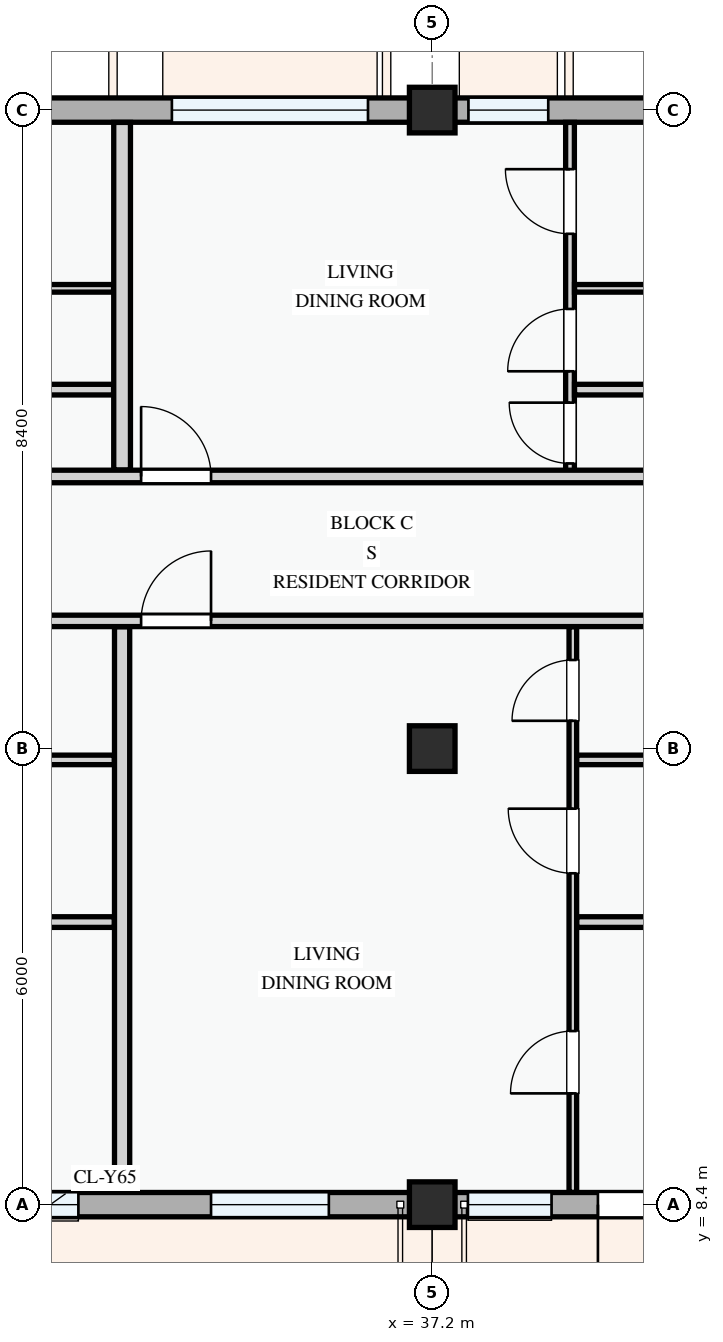
"""IFC4 building model, lengths in metres.
Left out: names, types, materials, properties, quantities, classifications, styles, units other than length and angle.
Written with IfcOpenShell. Run it as: python <this file> out.ifc"""

import sys

from ifc_helpers import new_model, si_unit, direction, frame, frame_2d, origin, origin_2d, place, context, subcontext, project, spatial, rectangle, extrude, element, fill, save


model = new_model("IFC4")
c1 = context("Model", 3, precision=1e-05, world=origin(), true_north=direction((0.0, 1.0)))
c2 = subcontext(c1, "Body", "Model", "MODEL_VIEW")
j1 = project(units=[si_unit("LENGTHUNIT", "METRE"), si_unit("PLANEANGLEUNIT", "RADIAN")], contexts=[c1])
p1 = place(None, origin())
s1 = spatial("IfcSite", under=j1, at=p1, CompositionType="ELEMENT")
p2 = place(p1, origin())
s2 = spatial("IfcBuilding", under=s1, at=p2, CompositionType="ELEMENT")
p3 = place(p2, frame((0.0, 0.0, 14.7)))
s3 = spatial("IfcBuildingStorey", under=s2, at=p3, CompositionType="ELEMENT", Elevation=14.7)
for number, where, z_axis, x_axis in (
    (1, (37.2, 8.4, 0.0), (0.0, 0.0, 1.0), (1.0, 0.0, 0.0)),
    (2, (37.2, 14.4, 0.0), (0.0, 0.0, 1.0), (1.0, 0.0, 0.0)),
    (3, (37.2, 22.8, 0.0), (0.0, 0.0, 1.0), (1.0, 0.0, 0.0)),
):
    element("IfcColumn", number, at=place(p3, frame(where, z_axis=z_axis, x_axis=x_axis)), inside=s3, PredefinedType="COLUMN", context=c2, shape_type="SweptSolid", body=[
        extrude(rectangle(XDim=0.6, YDim=0.6, at=origin_2d()), origin(), (0.0, 0.0, 1.0), 3.3),
    ])
p4 = place(p3, frame((28.8, 8.4, 0.0), z_axis=(0.0, 0.0, 1.0), x_axis=(1.0, 0.0, 0.0)))
e4 = element("IfcWall", 4, at=p4, inside=s3, PredefinedType="STANDARD", context=c2, shape_type="SweptSolid", body=[
    extrude(rectangle(XDim=8.4, YDim=0.32, at=frame_2d((4.2, 0.0))), origin(), (0.0, 0.0, 1.0), 2.375),
])
p5 = place(p4, frame((0.62, 0.0, 0.0)))
e5 = element("IfcOpeningElement", 5, at=p5, cuts=e4, PredefinedType="OPENING", context=c2, shape_type="SweptSolid", body=[
    extrude(rectangle(XDim=1.25, YDim=2.2, at=frame_2d((0.625, 1.1))), frame((0.0, 0.17, 0.0), z_axis=(0.0, -1.0, 0.0), x_axis=(1.0, 0.0, 0.0)), (0.0, 0.0, 1.0), 0.34),
])
p6 = place(p4, frame((2.495, 0.0, 0.78)))
e6 = element("IfcOpeningElement", 6, at=p6, cuts=e4, PredefinedType="OPENING", context=c2, shape_type="SweptSolid", body=[
    extrude(rectangle(XDim=1.25, YDim=1.3, at=frame_2d((0.625, 0.65))), frame((0.0, 0.17, 0.0), z_axis=(0.0, -1.0, 0.0), x_axis=(1.0, 0.0, 0.0)), (0.0, 0.0, 1.0), 0.34),
])
p7 = place(p4, frame((5.49, 0.0, 0.78)))
e7 = element("IfcOpeningElement", 7, at=p7, cuts=e4, PredefinedType="OPENING", context=c2, shape_type="SweptSolid", body=[
    extrude(rectangle(XDim=1.55, YDim=1.4, at=frame_2d((0.775, 0.7))), frame((0.0, 0.17, 0.0), z_axis=(0.0, -1.0, 0.0), x_axis=(1.0, 0.0, 0.0)), (0.0, 0.0, 1.0), 0.34),
])
p8 = place(p3, frame((37.2, 8.4, 0.0), z_axis=(0.0, 0.0, 1.0), x_axis=(1.0, 0.0, 0.0)))
e8 = element("IfcWall", 8, at=p8, inside=s3, PredefinedType="STANDARD", context=c2, shape_type="SweptSolid", body=[
    extrude(rectangle(XDim=6.0, YDim=0.32, at=frame_2d((3.0, 0.0))), origin(), (0.0, 0.0, 1.0), 2.475),
])
p9 = place(p8, frame((2.18, 0.0, 0.0)))
e9 = element("IfcOpeningElement", 9, at=p9, cuts=e8, PredefinedType="OPENING", context=c2, shape_type="SweptSolid", body=[
    extrude(rectangle(XDim=1.3, YDim=2.15, at=frame_2d((0.65, 1.075))), frame((0.0, 0.17, 0.0), z_axis=(0.0, -1.0, 0.0), x_axis=(1.0, 0.0, 0.0)), (0.0, 0.0, 1.0), 0.34),
])
p10 = place(p8, frame((0.47, 0.0, 0.78)))
e10 = element("IfcOpeningElement", 10, at=p10, cuts=e8, PredefinedType="OPENING", context=c2, shape_type="SweptSolid", body=[
    extrude(rectangle(XDim=1.1, YDim=1.3, at=frame_2d((0.55, 0.65))), frame((0.0, 0.17, 0.0), z_axis=(0.0, -1.0, 0.0), x_axis=(1.0, 0.0, 0.0)), (0.0, 0.0, 1.0), 0.34),
])
p11 = place(p8, frame((3.88, 0.0, 0.78)))
e11 = element("IfcOpeningElement", 11, at=p11, cuts=e8, PredefinedType="OPENING", context=c2, shape_type="SweptSolid", body=[
    extrude(rectangle(XDim=1.58, YDim=1.48, at=frame_2d((0.79, 0.74))), frame((0.0, 0.17, 0.0), z_axis=(0.0, -1.0, 0.0), x_axis=(1.0, 0.0, 0.0)), (0.0, 0.0, 1.0), 0.34),
])
p12 = place(p3, frame((43.2, 22.8, 0.0), z_axis=(0.0, 0.0, 1.0), x_axis=(-1.0, 0.0, 0.0)))
e12 = element("IfcWall", 12, at=p12, inside=s3, PredefinedType="STANDARD", context=c2, shape_type="SweptSolid", body=[
    extrude(rectangle(XDim=6.0, YDim=0.32, at=frame_2d((3.0, 0.0))), origin(), (0.0, 0.0, 1.0), 2.475),
])
p13 = place(p12, frame((1.439, 0.0, 0.78)))
e13 = element("IfcOpeningElement", 13, at=p13, cuts=e12, PredefinedType="OPENING", context=c2, shape_type="SweptSolid", body=[
    extrude(rectangle(XDim=1.5, YDim=1.5, at=frame_2d((0.75, 0.75))), frame((0.0, 0.17, 0.0), z_axis=(0.0, -1.0, 0.0), x_axis=(1.0, 0.0, 0.0)), (0.0, 0.0, 1.0), 0.34),
])
p14 = place(p12, frame((4.474, 0.0, 0.78)))
e14 = element("IfcOpeningElement", 14, at=p14, cuts=e12, PredefinedType="OPENING", context=c2, shape_type="SweptSolid", body=[
    extrude(rectangle(XDim=1.05, YDim=1.2, at=frame_2d((0.525, 0.6))), frame((0.0, 0.17, 0.0), z_axis=(0.0, -1.0, 0.0), x_axis=(1.0, 0.0, 0.0)), (0.0, 0.0, 1.0), 0.34),
])
p15 = place(p3, frame((37.2, 22.8, 0.0), z_axis=(0.0, 0.0, 1.0), x_axis=(-1.0, 0.0, 0.0)))
e15 = element("IfcWall", 15, at=p15, inside=s3, PredefinedType="STANDARD", context=c2, shape_type="SweptSolid", body=[
    extrude(rectangle(XDim=8.4, YDim=0.32, at=frame_2d((4.2, 0.0))), origin(), (0.0, 0.0, 1.0), 2.375),
])
p16 = place(p15, frame((0.845, 0.0, 0.78)))
e16 = element("IfcOpeningElement", 16, at=p16, cuts=e15, PredefinedType="OPENING", context=c2, shape_type="SweptSolid", body=[
    extrude(rectangle(XDim=2.58, YDim=1.48, at=frame_2d((1.29, 0.74))), frame((0.0, 0.17, 0.0), z_axis=(0.0, -1.0, 0.0), x_axis=(1.0, 0.0, 0.0)), (0.0, 0.0, 1.0), 0.34),
])
p17 = place(p15, frame((5.495, 0.0, 0.78)))
e17 = element("IfcOpeningElement", 17, at=p17, cuts=e15, PredefinedType="OPENING", context=c2, shape_type="SweptSolid", body=[
    extrude(rectangle(XDim=1.3, YDim=1.4, at=frame_2d((0.65, 0.7))), frame((0.0, 0.17, 0.0), z_axis=(0.0, -1.0, 0.0), x_axis=(1.0, 0.0, 0.0)), (0.0, 0.0, 1.0), 0.34),
])
p18 = place(p3, frame((27.042, 12.118, 0.0), z_axis=(0.0, 0.0, 1.0), x_axis=(1.0, 0.0, 0.0)))
e18 = element("IfcWall", 18, at=p18, inside=s3, PredefinedType="PARTITIONING", context=c2, shape_type="SweptSolid", body=[
    extrude(rectangle(XDim=5.976, YDim=0.14, at=frame_2d((2.988, 0.0))), origin(), (0.0, 0.0, 1.0), 3.0),
])
p19 = place(p3, frame((27.042, 14.251, 0.0), z_axis=(0.0, 0.0, 1.0), x_axis=(1.0, 0.0, 0.0)))
e19 = element("IfcWall", 19, at=p19, inside=s3, PredefinedType="PARTITIONING", context=c2, shape_type="SweptSolid", body=[
    extrude(rectangle(XDim=5.976, YDim=0.125, at=frame_2d((2.988, 0.0))), origin(), (0.0, 0.0, 1.0), 2.375),
])
p20 = place(p3, frame((27.04, 20.455, 0.0), z_axis=(0.0, 0.0, 1.0), x_axis=(1.0, 0.0, 0.0)))
e20 = element("IfcWall", 20, at=p20, inside=s3, PredefinedType="PARTITIONING", context=c2, shape_type="SweptSolid", body=[
    extrude(rectangle(XDim=5.968, YDim=0.1, at=frame_2d((2.984, 0.0))), origin(), (0.0, 0.0, 1.0), 3.0),
])
p21 = place(p3, frame((27.04, 19.122, 0.0), z_axis=(0.0, 0.0, 1.0), x_axis=(1.0, 0.0, 0.0)))
e21 = element("IfcWall", 21, at=p21, inside=s3, PredefinedType="PARTITIONING", context=c2, shape_type="SweptSolid", body=[
    extrude(rectangle(XDim=5.968, YDim=0.14, at=frame_2d((2.984, 0.0))), origin(), (0.0, 0.0, 1.0), 3.0),
])
p22 = place(p3, frame((39.05, 8.562, 0.0), z_axis=(0.0, 0.0, 1.0), x_axis=(0.0, 1.0, 0.0)))
e22 = element("IfcWall", 22, at=p22, inside=s3, PredefinedType="PARTITIONING", context=c2, shape_type="SweptSolid", body=[
    extrude(rectangle(XDim=7.441, YDim=0.1, at=frame_2d((3.72, 0.0))), origin(), (0.0, 0.0, 1.0), 3.0),
])
p23 = place(p22, frame((1.302, 0.0, 0.0)))
e23 = element("IfcOpeningElement", 23, at=p23, cuts=e22, PredefinedType="OPENING", context=c2, shape_type="SweptSolid", body=[
    extrude(rectangle(XDim=0.82, YDim=2.08, at=frame_2d((0.41, 1.04))), frame((0.0, 0.06, 0.0), z_axis=(0.0, -1.0, 0.0), x_axis=(1.0, 0.0, 0.0)), (0.0, 0.0, 1.0), 0.12),
])
p24 = place(p22, frame((4.198, 0.0, 0.0)))
e24 = element("IfcOpeningElement", 24, at=p24, cuts=e22, PredefinedType="OPENING", context=c2, shape_type="SweptSolid", body=[
    extrude(rectangle(XDim=0.85, YDim=2.1, at=frame_2d((0.425, 1.05))), frame((0.0, 0.06, 0.0), z_axis=(0.0, -1.0, 0.0), x_axis=(1.0, 0.0, 0.0)), (0.0, 0.0, 1.0), 0.12),
])
p25 = place(p22, frame((6.204, 0.0, 0.0)))
e25 = element("IfcOpeningElement", 25, at=p25, cuts=e22, PredefinedType="OPENING", context=c2, shape_type="SweptSolid", body=[
    extrude(rectangle(XDim=0.8, YDim=2.1, at=frame_2d((0.4, 1.05))), frame((0.0, 0.06, 0.0), z_axis=(0.0, -1.0, 0.0), x_axis=(1.0, 0.0, 0.0)), (0.0, 0.0, 1.0), 0.12),
])
p26 = place(p3, frame((39.102, 12.118, 0.0), z_axis=(0.0, 0.0, 1.0), x_axis=(1.0, 0.0, 0.0)))
e26 = element("IfcWall", 26, at=p26, inside=s3, PredefinedType="PARTITIONING", context=c2, shape_type="SweptSolid", body=[
    extrude(rectangle(XDim=5.783, YDim=0.14, at=frame_2d((2.892, 0.0))), origin(), (0.0, 0.0, 1.0), 3.0),
])
p27 = place(p3, frame((39.102, 14.251, 0.0), z_axis=(0.0, 0.0, 1.0), x_axis=(1.0, 0.0, 0.0)))
e27 = element("IfcWall", 27, at=p27, inside=s3, PredefinedType="PARTITIONING", context=c2, shape_type="SweptSolid", body=[
    extrude(rectangle(XDim=5.783, YDim=0.125, at=frame_2d((2.892, 0.0))), origin(), (0.0, 0.0, 1.0), 2.375),
])
p28 = place(p3, frame((39.013, 17.98, 0.0), z_axis=(0.0, 0.0, 1.0), x_axis=(0.0, 1.0, 0.0)))
e28 = element("IfcWall", 28, at=p28, inside=s3, PredefinedType="PARTITIONING", context=c2, shape_type="SweptSolid", body=[
    extrude(rectangle(XDim=4.658, YDim=0.115, at=frame_2d((2.329, 0.0))), origin(), (0.0, 0.0, 1.0), 3.0),
])
p29 = place(p28, frame((0.171, 0.0, 0.0)))
e29 = element("IfcOpeningElement", 29, at=p29, cuts=e28, PredefinedType="OPENING", context=c2, shape_type="SweptSolid", body=[
    extrude(rectangle(XDim=0.8, YDim=2.1, at=frame_2d((0.4, 1.05))), frame((0.0, 0.067, 0.0), z_axis=(0.0, -1.0, 0.0), x_axis=(1.0, 0.0, 0.0)), (0.0, 0.0, 1.0), 0.135),
])
p30 = place(p28, frame((1.384, 0.0, 0.0)))
e30 = element("IfcOpeningElement", 30, at=p30, cuts=e28, PredefinedType="OPENING", context=c2, shape_type="SweptSolid", body=[
    extrude(rectangle(XDim=0.82, YDim=2.08, at=frame_2d((0.41, 1.04))), frame((0.0, 0.067, 0.0), z_axis=(0.0, -1.0, 0.0), x_axis=(1.0, 0.0, 0.0)), (0.0, 0.0, 1.0), 0.135),
])
p31 = place(p28, frame((3.193, 0.0, 0.0)))
e31 = element("IfcOpeningElement", 31, at=p31, cuts=e28, PredefinedType="OPENING", context=c2, shape_type="SweptSolid", body=[
    extrude(rectangle(XDim=0.85, YDim=2.1, at=frame_2d((0.425, 1.05))), frame((0.0, 0.067, 0.0), z_axis=(0.0, -1.0, 0.0), x_axis=(1.0, 0.0, 0.0)), (0.0, 0.0, 1.0), 0.135),
])
p32 = place(p3, frame((39.072, 20.455, 0.0), z_axis=(0.0, 0.0, 1.0), x_axis=(1.0, 0.0, 0.0)))
e32 = element("IfcWall", 32, at=p32, inside=s3, PredefinedType="PARTITIONING", context=c2, shape_type="SweptSolid", body=[
    extrude(rectangle(XDim=5.806, YDim=0.1, at=frame_2d((2.903, 0.0))), origin(), (0.0, 0.0, 1.0), 3.0),
])
p33 = place(p3, frame((39.072, 19.122, 0.0), z_axis=(0.0, 0.0, 1.0), x_axis=(1.0, 0.0, 0.0)))
e33 = element("IfcWall", 33, at=p33, inside=s3, PredefinedType="PARTITIONING", context=c2, shape_type="SweptSolid", body=[
    extrude(rectangle(XDim=5.806, YDim=0.14, at=frame_2d((2.903, 0.0))), origin(), (0.0, 0.0, 1.0), 3.0),
])
p34 = place(p3, frame((33.12, 8.562, 0.0), z_axis=(0.0, 0.0, 1.0), x_axis=(0.0, 1.0, 0.0)))
e34 = element("IfcWall", 34, at=p34, inside=s3, PredefinedType="PARTITIONING", context=c2, shape_type="SweptSolid", body=[
    extrude(rectangle(XDim=7.441, YDim=0.2, at=frame_2d((3.72, 0.0))), origin(), (0.0, 0.0, 1.0), 2.585),
])
p35 = place(p3, frame((33.12, 18.064, 0.0), z_axis=(0.0, 0.0, 1.0), x_axis=(0.0, 1.0, 0.0)))
e35 = element("IfcWall", 35, at=p35, inside=s3, PredefinedType="PARTITIONING", context=c2, shape_type="SweptSolid", body=[
    extrude(rectangle(XDim=4.573, YDim=0.22, at=frame_2d((2.287, 0.0))), origin(), (0.0, 0.0, 1.0), 2.585),
])
p36 = place(p3, frame((22.66, 16.08, 0.0), z_axis=(0.0, 0.0, 1.0), x_axis=(1.0, 0.0, 0.0)))
e36 = element("IfcWall", 36, at=p36, inside=s3, PredefinedType="PARTITIONING", context=c2, shape_type="SweptSolid", body=[
    extrude(rectangle(XDim=34.778, YDim=0.15, at=frame_2d((17.389, 0.0))), origin(), (0.0, 0.0, 1.0), 3.0),
])
p37 = place(p36, frame((2.672, 0.0, 0.0)))
e37 = element("IfcOpeningElement", 37, at=p37, cuts=e36, PredefinedType="OPENING", context=c2, shape_type="SweptSolid", body=[
    extrude(rectangle(XDim=0.96, YDim=2.12, at=frame_2d((0.48, 1.06))), frame((0.0, 0.085, 0.0), z_axis=(0.0, -1.0, 0.0), x_axis=(1.0, 0.0, 0.0)), (0.0, 0.0, 1.0), 0.17),
])
p38 = place(p36, frame((10.71, 0.0, 0.0)))
e38 = element("IfcOpeningElement", 38, at=p38, cuts=e36, PredefinedType="OPENING", context=c2, shape_type="SweptSolid", body=[
    extrude(rectangle(XDim=0.92, YDim=2.1, at=frame_2d((0.46, 1.05))), frame((0.0, 0.085, 0.0), z_axis=(0.0, -1.0, 0.0), x_axis=(1.0, 0.0, 0.0)), (0.0, 0.0, 1.0), 0.17),
])
p39 = place(p36, frame((24.28, 0.0, 0.0)))
e39 = element("IfcOpeningElement", 39, at=p39, cuts=e36, PredefinedType="OPENING", context=c2, shape_type="SweptSolid", body=[
    extrude(rectangle(XDim=0.92, YDim=2.1, at=frame_2d((0.46, 1.05))), frame((0.0, 0.085, 0.0), z_axis=(0.0, -1.0, 0.0), x_axis=(1.0, 0.0, 0.0)), (0.0, 0.0, 1.0), 0.17),
])
p40 = place(p3, frame((22.66, 17.98, 0.0), z_axis=(0.0, 0.0, 1.0), x_axis=(1.0, 0.0, 0.0)))
e40 = element("IfcWall", 40, at=p40, inside=s3, PredefinedType="PARTITIONING", context=c2, shape_type="SweptSolid", body=[
    extrude(rectangle(XDim=34.778, YDim=0.165, at=frame_2d((17.389, 0.0))), origin(), (0.0, 0.0, 1.0), 3.0),
])
p41 = place(p40, frame((2.664, 0.0, 0.0)))
e41 = element("IfcOpeningElement", 41, at=p41, cuts=e40, PredefinedType="OPENING", context=c2, shape_type="SweptSolid", body=[
    extrude(rectangle(XDim=0.92, YDim=2.1, at=frame_2d((0.46, 1.05))), frame((0.0, 0.093, 0.0), z_axis=(0.0, -1.0, 0.0), x_axis=(1.0, 0.0, 0.0)), (0.0, 0.0, 1.0), 0.185),
])
p42 = place(p40, frame((10.71, 0.0, 0.0)))
e42 = element("IfcOpeningElement", 42, at=p42, cuts=e40, PredefinedType="OPENING", context=c2, shape_type="SweptSolid", body=[
    extrude(rectangle(XDim=0.92, YDim=2.1, at=frame_2d((0.46, 1.05))), frame((0.0, 0.093, 0.0), z_axis=(0.0, -1.0, 0.0), x_axis=(1.0, 0.0, 0.0)), (0.0, 0.0, 1.0), 0.185),
])
p43 = place(p40, frame((24.254, 0.0, 0.0)))
e43 = element("IfcOpeningElement", 43, at=p43, cuts=e40, PredefinedType="OPENING", context=c2, shape_type="SweptSolid", body=[
    extrude(rectangle(XDim=0.96, YDim=2.12, at=frame_2d((0.48, 1.06))), frame((0.0, 0.093, 0.0), z_axis=(0.0, -1.0, 0.0), x_axis=(1.0, 0.0, 0.0)), (0.0, 0.0, 1.0), 0.185),
])
p44 = place(p6, origin())
e44 = element("IfcWindow", 44, at=p44, inside=s3, PartitioningType="SINGLE_PANEL", PredefinedType="WINDOW", context=c2, shape_type="SweptSolid", body=[
    extrude(rectangle(XDim=1.25, YDim=1.3, at=frame_2d((0.625, 0.65))), frame((0.0, 0.03, 0.0), z_axis=(0.0, -1.0, 0.0), x_axis=(1.0, 0.0, 0.0)), (0.0, 0.0, 1.0), 0.06),
])
fill(e6, e44)
p45 = place(p7, origin())
e45 = element("IfcWindow", 45, at=p45, inside=s3, PartitioningType="SINGLE_PANEL", PredefinedType="WINDOW", context=c2, shape_type="SweptSolid", body=[
    extrude(rectangle(XDim=1.55, YDim=1.4, at=frame_2d((0.775, 0.7))), frame((0.0, 0.03, 0.0), z_axis=(0.0, -1.0, 0.0), x_axis=(1.0, 0.0, 0.0)), (0.0, 0.0, 1.0), 0.06),
])
fill(e7, e45)
p46 = place(p9, frame((1.3, 0.0, 0.0), z_axis=(0.0, 0.0, 1.0), x_axis=(-1.0, 0.0, 0.0)))
e46 = element("IfcDoor", 46, at=p46, inside=s3, OperationType="SINGLE_SWING_RIGHT", PredefinedType="DOOR", context=c2, shape_type="SweptSolid", body=[
    extrude(rectangle(XDim=1.3, YDim=2.15, at=frame_2d((0.65, 1.075))), frame((0.0, 0.025, 0.0), z_axis=(0.0, -1.0, 0.0), x_axis=(1.0, 0.0, 0.0)), (0.0, 0.0, 1.0), 0.05),
])
fill(e9, e46)
p47 = place(p10, origin())
e47 = element("IfcWindow", 47, at=p47, inside=s3, PartitioningType="SINGLE_PANEL", PredefinedType="WINDOW", context=c2, shape_type="SweptSolid", body=[
    extrude(rectangle(XDim=1.1, YDim=1.3, at=frame_2d((0.55, 0.65))), frame((0.0, 0.03, 0.0), z_axis=(0.0, -1.0, 0.0), x_axis=(1.0, 0.0, 0.0)), (0.0, 0.0, 1.0), 0.06),
])
fill(e10, e47)
p48 = place(p14, origin())
e48 = element("IfcWindow", 48, at=p48, inside=s3, PartitioningType="SINGLE_PANEL", PredefinedType="WINDOW", context=c2, shape_type="SweptSolid", body=[
    extrude(rectangle(XDim=1.05, YDim=1.2, at=frame_2d((0.525, 0.6))), frame((0.0, 0.03, 0.0), z_axis=(0.0, -1.0, 0.0), x_axis=(1.0, 0.0, 0.0)), (0.0, 0.0, 1.0), 0.06),
])
fill(e14, e48)
p49 = place(p16, origin())
e49 = element("IfcWindow", 49, at=p49, inside=s3, PartitioningType="DOUBLE_PANEL_VERTICAL", PredefinedType="WINDOW", context=c2, shape_type="SweptSolid", body=[
    extrude(rectangle(XDim=2.58, YDim=1.48, at=frame_2d((1.29, 0.74))), frame((0.0, 0.03, 0.0), z_axis=(0.0, -1.0, 0.0), x_axis=(1.0, 0.0, 0.0)), (0.0, 0.0, 1.0), 0.06),
])
fill(e16, e49)
p50 = place(p23, origin())
e50 = element("IfcDoor", 50, at=p50, inside=s3, OperationType="SINGLE_SWING_LEFT", PredefinedType="DOOR", context=c2, shape_type="SweptSolid", body=[
    extrude(rectangle(XDim=0.82, YDim=2.08, at=frame_2d((0.41, 1.04))), frame((0.0, 0.025, 0.0), z_axis=(0.0, -1.0, 0.0), x_axis=(1.0, 0.0, 0.0)), (0.0, 0.0, 1.0), 0.05),
])
fill(e23, e50)
p51 = place(p24, origin())
e51 = element("IfcDoor", 51, at=p51, inside=s3, OperationType="SINGLE_SWING_RIGHT", PredefinedType="DOOR", context=c2, shape_type="SweptSolid", body=[
    extrude(rectangle(XDim=0.85, YDim=2.1, at=frame_2d((0.425, 1.05))), frame((0.0, 0.025, 0.0), z_axis=(0.0, -1.0, 0.0), x_axis=(1.0, 0.0, 0.0)), (0.0, 0.0, 1.0), 0.05),
])
fill(e24, e51)
p52 = place(p25, origin())
e52 = element("IfcDoor", 52, at=p52, inside=s3, OperationType="SINGLE_SWING_LEFT", PredefinedType="DOOR", context=c2, shape_type="SweptSolid", body=[
    extrude(rectangle(XDim=0.8, YDim=2.1, at=frame_2d((0.4, 1.05))), frame((0.0, 0.025, 0.0), z_axis=(0.0, -1.0, 0.0), x_axis=(1.0, 0.0, 0.0)), (0.0, 0.0, 1.0), 0.05),
])
fill(e25, e52)
p53 = place(p29, origin())
e53 = element("IfcDoor", 53, at=p53, inside=s3, OperationType="SINGLE_SWING_RIGHT", PredefinedType="DOOR", context=c2, shape_type="SweptSolid", body=[
    extrude(rectangle(XDim=0.8, YDim=2.1, at=frame_2d((0.4, 1.05))), frame((0.0, 0.025, 0.0), z_axis=(0.0, -1.0, 0.0), x_axis=(1.0, 0.0, 0.0)), (0.0, 0.0, 1.0), 0.05),
])
fill(e29, e53)
p54 = place(p30, origin())
e54 = element("IfcDoor", 54, at=p54, inside=s3, OperationType="SINGLE_SWING_LEFT", PredefinedType="DOOR", context=c2, shape_type="SweptSolid", body=[
    extrude(rectangle(XDim=0.82, YDim=2.08, at=frame_2d((0.41, 1.04))), frame((0.0, 0.025, 0.0), z_axis=(0.0, -1.0, 0.0), x_axis=(1.0, 0.0, 0.0)), (0.0, 0.0, 1.0), 0.05),
])
fill(e30, e54)
p55 = place(p31, origin())
e55 = element("IfcDoor", 55, at=p55, inside=s3, OperationType="SINGLE_SWING_RIGHT", PredefinedType="DOOR", context=c2, shape_type="SweptSolid", body=[
    extrude(rectangle(XDim=0.85, YDim=2.1, at=frame_2d((0.425, 1.05))), frame((0.0, 0.025, 0.0), z_axis=(0.0, -1.0, 0.0), x_axis=(1.0, 0.0, 0.0)), (0.0, 0.0, 1.0), 0.05),
])
fill(e31, e55)
p56 = place(p38, origin())
e56 = element("IfcDoor", 56, at=p56, inside=s3, OperationType="SINGLE_SWING_RIGHT", PredefinedType="DOOR", context=c2, shape_type="SweptSolid", body=[
    extrude(rectangle(XDim=0.92, YDim=2.1, at=frame_2d((0.46, 1.05))), frame((0.0, 0.025, 0.0), z_axis=(0.0, -1.0, 0.0), x_axis=(1.0, 0.0, 0.0)), (0.0, 0.0, 1.0), 0.05),
])
fill(e38, e56)
p57 = place(p42, origin())
e57 = element("IfcDoor", 57, at=p57, inside=s3, OperationType="SINGLE_SWING_LEFT", PredefinedType="DOOR", context=c2, shape_type="SweptSolid", body=[
    extrude(rectangle(XDim=0.92, YDim=2.1, at=frame_2d((0.46, 1.05))), frame((0.0, 0.025, 0.0), z_axis=(0.0, -1.0, 0.0), x_axis=(1.0, 0.0, 0.0)), (0.0, 0.0, 1.0), 0.05),
])
fill(e42, e57)
save(model, sys.argv[1])
